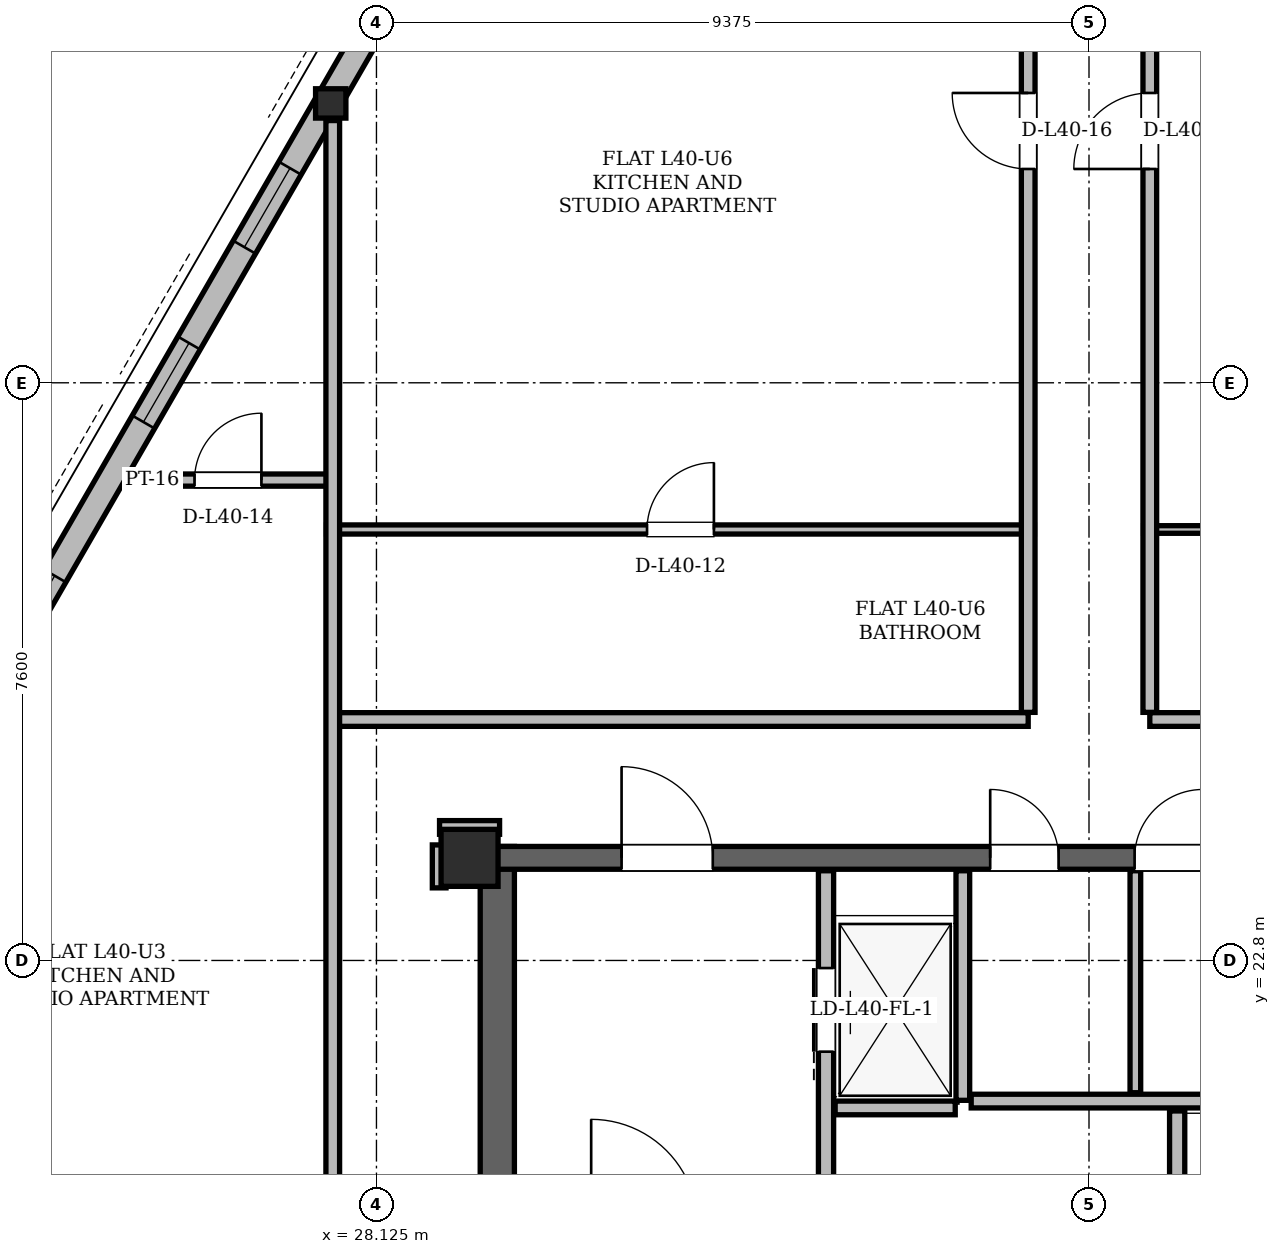
"""IFC4 building model, lengths in metres.
Left out: names, types, materials, properties, quantities, classifications, styles, units other than length and angle.
Written with IfcOpenShell. Run it as: python <this file> out.ifc"""

import sys

from ifc_helpers import new_model, si_unit, direction, frame, frame_2d, origin, origin_2d, place, context, subcontext, project, spatial, rectangle, hollow_rectangle, i_section, extrude, element, fill, save


model = new_model("IFC4")
c1 = context("Model", 3, precision=1e-05, world=origin(), true_north=direction((0.0, 1.0)))
c2 = subcontext(c1, "Body", "Model", "MODEL_VIEW")
j1 = project(units=[si_unit("LENGTHUNIT", "METRE"), si_unit("PLANEANGLEUNIT", "RADIAN")], contexts=[c1])
p1 = place(None, origin())
s1 = spatial("IfcSite", under=j1, at=p1, CompositionType="ELEMENT")
p2 = place(p1, origin())
s2 = spatial("IfcBuilding", under=s1, at=p2, CompositionType="ELEMENT")
p3 = place(p2, frame((0.0, 0.0, 153.0)))
s3 = spatial("IfcBuildingStorey", under=s2, at=p3, CompositionType="ELEMENT", Elevation=153.0)
p4 = place(p3, frame((29.35, 24.15, 0.0), z_axis=(0.0, 0.0, 1.0), x_axis=(1.0, 0.0, 0.0)))
e1 = element("IfcColumn", 1, at=p4, inside=s3, PredefinedType="COLUMN", context=c2, shape_type="SweptSolid", body=[
    extrude(hollow_rectangle(XDim=0.75, YDim=0.75, WallThickness=0.06, at=origin_2d()), origin(), (0.0, 0.0, 1.0), 3.6),
])
p5 = place(p3, frame((27.487, 34.089, 0.004), z_axis=(0.020322934204, -0.007408695078, 0.999766017417), x_axis=(0.34249983262, 0.939517889481, 0.0)))
e2 = element("IfcColumn", 2, at=p5, inside=s3, PredefinedType="COLUMN", context=c2, shape_type="SweptSolid", body=[
    extrude(i_section(OverallWidth=0.399, OverallDepth=0.386, WebThickness=0.021, FlangeThickness=0.033, at=origin_2d()), origin(), (0.0, 0.0, 1.0), 3.592),
])
p6 = place(p3, frame((29.715, 11.0, 0.0), z_axis=(0.0, 0.0, 1.0), x_axis=(0.0, 1.0, 0.0)))
e3 = element("IfcWall", 3, at=p6, inside=s3, PredefinedType="SHEAR", context=c2, shape_type="SweptSolid", body=[
    extrude(rectangle(XDim=13.3, YDim=0.45, at=frame_2d((6.65, 0.0))), origin(), (0.0, 0.0, 1.0), 3.38),
])
p7 = place(p3, frame((29.65, 24.15, 0.0), z_axis=(0.0, 0.0, 1.0), x_axis=(1.0, 0.0, 0.0)))
e4 = element("IfcWall", 4, at=p7, inside=s3, PredefinedType="SHEAR", context=c2, shape_type="SweptSolid", body=[
    extrude(rectangle(XDim=15.7, YDim=0.3, at=frame_2d((7.85, 0.0))), origin(), (0.0, 0.0, 1.0), 3.38),
])
p8 = place(p7, frame((1.7, 0.0, 0.0)))
e5 = element("IfcOpeningElement", 5, at=p8, cuts=e4, PredefinedType="OPENING", context=c2, shape_type="SweptSolid", body=[
    extrude(rectangle(XDim=1.2, YDim=2.2, at=frame_2d((0.6, 1.1))), frame((0.0, 0.15, 0.0), z_axis=(0.0, -1.0, 0.0), x_axis=(1.0, 0.0, 0.0)), (0.0, 0.0, 1.0), 0.3),
])
p9 = place(p7, frame((12.8, 0.0, 0.0)))
e6 = element("IfcOpeningElement", 6, at=p9, cuts=e4, PredefinedType="OPENING", context=c2, shape_type="SweptSolid", body=[
    extrude(rectangle(XDim=1.2, YDim=2.2, at=frame_2d((0.6, 1.1))), frame((0.0, 0.15, 0.0), z_axis=(0.0, -1.0, 0.0), x_axis=(1.0, 0.0, 0.0)), (0.0, 0.0, 1.0), 0.3),
])
p10 = place(p7, frame((6.55, 0.0, 0.0)))
e7 = element("IfcOpeningElement", 7, at=p10, cuts=e4, PredefinedType="OPENING", context=c2, shape_type="SweptSolid", body=[
    extrude(rectangle(XDim=0.9, YDim=2.05, at=frame_2d((0.45, 1.025))), frame((0.0, 0.15, 0.0), z_axis=(0.0, -1.0, 0.0), x_axis=(1.0, 0.0, 0.0)), (0.0, 0.0, 1.0), 0.3),
])
p11 = place(p7, frame((8.45, 0.0, 0.0)))
e8 = element("IfcOpeningElement", 8, at=p11, cuts=e4, PredefinedType="OPENING", context=c2, shape_type="SweptSolid", body=[
    extrude(rectangle(XDim=0.9, YDim=2.05, at=frame_2d((0.45, 1.025))), frame((0.0, 0.15, 0.0), z_axis=(0.0, -1.0, 0.0), x_axis=(1.0, 0.0, 0.0)), (0.0, 0.0, 1.0), 0.3),
])
p12 = place(p3, frame((32.818, 43.322, 0.0), z_axis=(0.0, 0.0, 1.0), x_axis=(-0.500000946011, -0.866024857604, 0.0)))
e9 = element("IfcWall", 9, at=p12, inside=s3, PredefinedType="SOLIDWALL", context=c2, shape_type="SweptSolid", body=[
    extrude(rectangle(XDim=35.54, YDim=0.34, at=frame_2d((17.77, 0.0))), origin(), (0.0, 0.0, 1.0), 2.6),
])
p13 = place(p12, frame((6.579, 0.0, 0.0)))
e10 = element("IfcOpeningElement", 10, at=p13, cuts=e9, PredefinedType="OPENING", context=c2, shape_type="SweptSolid", body=[
    extrude(rectangle(XDim=1.5, YDim=2.2, at=frame_2d((0.75, 1.1))), frame((0.0, 0.17, 0.0), z_axis=(0.0, -1.0, 0.0), x_axis=(1.0, 0.0, 0.0)), (0.0, 0.0, 1.0), 0.34),
])
p14 = place(p12, frame((26.005, 0.0, 0.0)))
e11 = element("IfcOpeningElement", 11, at=p14, cuts=e9, PredefinedType="OPENING", context=c2, shape_type="SweptSolid", body=[
    extrude(rectangle(XDim=1.5, YDim=2.2, at=frame_2d((0.75, 1.1))), frame((0.0, 0.17, 0.0), z_axis=(0.0, -1.0, 0.0), x_axis=(1.0, 0.0, 0.0)), (0.0, 0.0, 1.0), 0.34),
])
p15 = place(p12, frame((33.049, 0.0, 0.85)))
e12 = element("IfcOpeningElement", 12, at=p15, cuts=e9, PredefinedType="OPENING", context=c2, shape_type="SweptSolid", body=[
    extrude(rectangle(XDim=1.2, YDim=1.48, at=frame_2d((0.6, 0.74))), frame((0.0, 0.17, 0.0), z_axis=(0.0, -1.0, 0.0), x_axis=(1.0, 0.0, 0.0)), (0.0, 0.0, 1.0), 0.34),
])
p16 = place(p12, frame((17.853, 0.0, 0.85)))
e13 = element("IfcOpeningElement", 13, at=p16, cuts=e9, PredefinedType="OPENING", context=c2, shape_type="SweptSolid", body=[
    extrude(rectangle(XDim=1.2, YDim=1.48, at=frame_2d((0.6, 0.74))), frame((0.0, 0.17, 0.0), z_axis=(0.0, -1.0, 0.0), x_axis=(1.0, 0.0, 0.0)), (0.0, 0.0, 1.0), 0.34),
])
p17 = place(p12, frame((11.661, 0.0, 0.85)))
e14 = element("IfcOpeningElement", 14, at=p17, cuts=e9, PredefinedType="OPENING", context=c2, shape_type="SweptSolid", body=[
    extrude(rectangle(XDim=1.2, YDim=1.48, at=frame_2d((0.6, 0.74))), frame((0.0, 0.17, 0.0), z_axis=(0.0, -1.0, 0.0), x_axis=(1.0, 0.0, 0.0)), (0.0, 0.0, 1.0), 0.34),
])
p18 = place(p12, frame((14.317, 0.0, 0.85)))
e15 = element("IfcOpeningElement", 15, at=p18, cuts=e9, PredefinedType="OPENING", context=c2, shape_type="SweptSolid", body=[
    extrude(rectangle(XDim=1.2, YDim=1.48, at=frame_2d((0.6, 0.74))), frame((0.0, 0.17, 0.0), z_axis=(0.0, -1.0, 0.0), x_axis=(1.0, 0.0, 0.0)), (0.0, 0.0, 1.0), 0.34),
])
p19 = place(p12, frame((2.865, 0.0, 0.85)))
e16 = element("IfcOpeningElement", 16, at=p19, cuts=e9, PredefinedType="OPENING", context=c2, shape_type="SweptSolid", body=[
    extrude(rectangle(XDim=1.6, YDim=1.64, at=frame_2d((0.8, 0.82))), frame((0.0, 0.17, 0.0), z_axis=(0.0, -1.0, 0.0), x_axis=(1.0, 0.0, 0.0)), (0.0, 0.0, 1.0), 0.34),
])
p20 = place(p3, frame((34.04, 19.48, 0.0), z_axis=(0.0, 0.0, 1.0), x_axis=(0.0, 1.0, 0.0)))
e17 = element("IfcWall", 17, at=p20, inside=s3, PredefinedType="PARTITIONING", context=c2, shape_type="SweptSolid", body=[
    extrude(rectangle(XDim=4.5, YDim=0.2, at=frame_2d((2.25, 0.0))), origin(), (0.0, 0.0, 1.0), 2.42),
])
p21 = place(p20, frame((2.12, 0.0, 0.0)))
e18 = element("IfcOpeningElement", 18, at=p21, cuts=e17, PredefinedType="OPENING", context=c2, shape_type="SweptSolid", body=[
    extrude(rectangle(XDim=1.1, YDim=2.2, at=frame_2d((0.55, 1.1))), frame((0.0, 0.1, 0.0), z_axis=(0.0, -1.0, 0.0), x_axis=(1.0, 0.0, 0.0)), (0.0, 0.0, 1.0), 0.2),
])
p22 = place(p3, frame((35.84, 20.96, 0.0), z_axis=(0.0, 0.0, 1.0), x_axis=(0.0, 1.0, 0.0)))
e19 = element("IfcWall", 19, at=p22, inside=s3, PredefinedType="PARTITIONING", context=c2, shape_type="SweptSolid", body=[
    extrude(rectangle(XDim=3.02, YDim=0.18, at=frame_2d((1.51, 0.0))), origin(), (0.0, 0.0, 1.0), 2.42),
])
p23 = place(p3, frame((34.16, 20.86, 0.0), z_axis=(0.0, 0.0, 1.0), x_axis=(1.0, 0.0, 0.0)))
e20 = element("IfcWall", 20, at=p23, inside=s3, PredefinedType="PARTITIONING", context=c2, shape_type="SweptSolid", body=[
    extrude(rectangle(XDim=1.58, YDim=0.18, at=frame_2d((0.79, 0.0))), origin(), (0.0, 0.0, 1.0), 3.38),
])
p24 = place(p3, frame((38.66, 11.72, 0.0), z_axis=(0.0, 0.0, 1.0), x_axis=(0.0, 1.0, 0.0)))
e21 = element("IfcWall", 21, at=p24, inside=s3, PredefinedType="PARTITIONING", context=c2, shape_type="SweptSolid", body=[
    extrude(rectangle(XDim=9.1, YDim=0.2, at=frame_2d((4.55, 0.0))), origin(), (0.0, 0.0, 1.0), 3.38),
])
p25 = place(p24, frame((0.255, 0.0, 0.0)))
e22 = element("IfcOpeningElement", 22, at=p25, cuts=e21, PredefinedType="OPENING", context=c2, shape_type="SweptSolid", body=[
    extrude(rectangle(XDim=1.05, YDim=2.15, at=frame_2d((0.525, 1.075))), frame((0.0, 0.1, 0.0), z_axis=(0.0, -1.0, 0.0), x_axis=(1.0, 0.0, 0.0)), (0.0, 0.0, 1.0), 0.2),
])
p26 = place(p24, frame((2.105, 0.0, 0.0)))
e23 = element("IfcOpeningElement", 23, at=p26, cuts=e21, PredefinedType="OPENING", context=c2, shape_type="SweptSolid", body=[
    extrude(rectangle(XDim=1.05, YDim=2.15, at=frame_2d((0.525, 1.075))), frame((0.0, 0.1, 0.0), z_axis=(0.0, -1.0, 0.0), x_axis=(1.0, 0.0, 0.0)), (0.0, 0.0, 1.0), 0.2),
])
p27 = place(p24, frame((3.955, 0.0, 0.0)))
e24 = element("IfcOpeningElement", 24, at=p27, cuts=e21, PredefinedType="OPENING", context=c2, shape_type="SweptSolid", body=[
    extrude(rectangle(XDim=1.05, YDim=2.15, at=frame_2d((0.525, 1.075))), frame((0.0, 0.1, 0.0), z_axis=(0.0, -1.0, 0.0), x_axis=(1.0, 0.0, 0.0)), (0.0, 0.0, 1.0), 0.2),
])
p28 = place(p3, frame((35.95, 20.95, 0.0), z_axis=(0.0, 0.0, 1.0), x_axis=(1.0, 0.0, 0.0)))
e25 = element("IfcWall", 25, at=p28, inside=s3, PredefinedType="PARTITIONING", context=c2, shape_type="SweptSolid", body=[
    extrude(rectangle(XDim=3.1, YDim=0.18, at=frame_2d((1.55, 0.0))), origin(), (0.0, 0.0, 1.0), 3.38),
])
p29 = place(p3, frame((38.11, 21.06, 0.0), z_axis=(0.0, 0.0, 1.0), x_axis=(0.0, 1.0, 0.0)))
e26 = element("IfcWall", 26, at=p29, inside=s3, PredefinedType="PARTITIONING", context=c2, shape_type="SweptSolid", body=[
    extrude(rectangle(XDim=2.92, YDim=0.14, at=frame_2d((1.46, 0.0))), origin(), (0.0, 0.0, 1.0), 2.42),
])
p30 = place(p3, frame((28.955, 24.55, 0.0), z_axis=(0.0, 0.0, 1.0), x_axis=(1.0, 0.0, 0.0)))
e27 = element("IfcWall", 27, at=p30, inside=s3, PredefinedType="PARTITIONING", context=c2, shape_type="SweptSolid", body=[
    extrude(rectangle(XDim=0.79, YDim=0.18, at=frame_2d((0.395, 0.0))), origin(), (0.0, 0.0, 1.0), 2.842),
])
p31 = place(p3, frame((27.55, 25.97, 0.0), z_axis=(0.0, 0.0, 1.0), x_axis=(1.0, 0.0, 0.0)))
e28 = element("IfcWall", 28, at=p31, inside=s3, PredefinedType="PARTITIONING", context=c2, shape_type="SweptSolid", body=[
    extrude(rectangle(XDim=9.15, YDim=0.18, at=frame_2d((4.575, 0.0))), origin(), (0.0, 0.0, 1.0), 2.842),
])
p32 = place(p3, frame((38.3, 25.97, 0.0), z_axis=(0.0, 0.0, 1.0), x_axis=(1.0, 0.0, 0.0)))
e29 = element("IfcWall", 29, at=p32, inside=s3, PredefinedType="PARTITIONING", context=c2, shape_type="SweptSolid", body=[
    extrude(rectangle(XDim=11.7, YDim=0.18, at=frame_2d((5.85, 0.0))), origin(), (0.0, 0.0, 1.0), 2.842),
])
p33 = place(p32, frame((9.832, 0.0, 0.0)))
e30 = element("IfcOpeningElement", 30, at=p33, cuts=e29, PredefinedType="OPENING", context=c2, shape_type="SweptSolid", body=[
    extrude(rectangle(XDim=1.0, YDim=2.18, at=frame_2d((0.5, 1.09))), frame((0.0, 0.09, 0.0), z_axis=(0.0, -1.0, 0.0), x_axis=(1.0, 0.0, 0.0)), (0.0, 0.0, 1.0), 0.18),
])
p34 = place(p3, frame((27.468, 28.47, 0.0), z_axis=(0.0, 0.0, 1.0), x_axis=(1.0, 0.0, 0.0)))
e31 = element("IfcWall", 31, at=p34, inside=s3, PredefinedType="PARTITIONING", context=c2, shape_type="SweptSolid", body=[
    extrude(rectangle(XDim=9.314, YDim=0.12, at=frame_2d((4.657, 0.0))), origin(), (0.0, 0.0, 1.0), 3.38),
])
p35 = place(p34, frame((4.217, 0.0, 0.0)))
e32 = element("IfcOpeningElement", 32, at=p35, cuts=e31, PredefinedType="OPENING", context=c2, shape_type="SweptSolid", body=[
    extrude(rectangle(XDim=0.88, YDim=2.08, at=frame_2d((0.44, 1.04))), frame((0.0, 0.06, 0.0), z_axis=(0.0, -1.0, 0.0), x_axis=(1.0, 0.0, 0.0)), (0.0, 0.0, 1.0), 0.12),
])
p36 = place(p3, frame((38.218, 28.47, 0.0), z_axis=(0.0, 0.0, 1.0), x_axis=(1.0, 0.0, 0.0)))
e33 = element("IfcWall", 33, at=p36, inside=s3, PredefinedType="PARTITIONING", context=c2, shape_type="SweptSolid", body=[
    extrude(rectangle(XDim=7.424, YDim=0.1, at=frame_2d((3.712, 0.0))), origin(), (0.0, 0.0, 1.0), 3.38),
])
p37 = place(p36, frame((3.272, 0.0, 0.0)))
e34 = element("IfcOpeningElement", 34, at=p37, cuts=e33, PredefinedType="OPENING", context=c2, shape_type="SweptSolid", body=[
    extrude(rectangle(XDim=0.88, YDim=2.08, at=frame_2d((0.44, 1.04))), frame((0.0, 0.05, 0.0), z_axis=(0.0, -1.0, 0.0), x_axis=(1.0, 0.0, 0.0)), (0.0, 0.0, 1.0), 0.1),
])
p38 = place(p3, frame((24.819, 29.12, 0.0), z_axis=(0.0, 0.0, 1.0), x_axis=(1.0, 0.0, 0.0)))
e35 = element("IfcWall", 35, at=p38, inside=s3, PredefinedType="PARTITIONING", context=c2, shape_type="SweptSolid", body=[
    extrude(rectangle(XDim=2.813, YDim=0.16, at=frame_2d((1.406, 0.0))), origin(), (0.0, 0.0, 1.0), 3.38),
])
p39 = place(p38, frame((0.912, 0.0, 0.0)))
e36 = element("IfcOpeningElement", 36, at=p39, cuts=e35, PredefinedType="OPENING", context=c2, shape_type="SweptSolid", body=[
    extrude(rectangle(XDim=0.88, YDim=2.08, at=frame_2d((0.44, 1.04))), frame((0.0, 0.08, 0.0), z_axis=(0.0, -1.0, 0.0), x_axis=(1.0, 0.0, 0.0)), (0.0, 0.0, 1.0), 0.16),
])
p40 = place(p3, frame((27.55, 18.544, 0.0), z_axis=(0.0, 0.0, 1.0), x_axis=(0.0, 1.0, 0.0)))
e37 = element("IfcWall", 37, at=p40, inside=s3, PredefinedType="PARTITIONING", context=c2, shape_type="SweptSolid", body=[
    extrude(rectangle(XDim=15.306, YDim=0.18, at=frame_2d((7.653, 0.0))), origin(), (0.0, 0.0, 1.0), 3.38),
])
p41 = place(p3, frame((28.95, 23.755, 0.0), z_axis=(0.0, 0.0, 1.0), x_axis=(0.0, 1.0, 0.0)))
e38 = element("IfcWall", 38, at=p41, inside=s3, PredefinedType="PARTITIONING", context=c2, shape_type="SweptSolid", body=[
    extrude(rectangle(XDim=0.565, YDim=0.18, at=frame_2d((0.283, 0.0))), origin(), (0.0, 0.0, 1.0), 3.38),
])
p42 = place(p3, frame((36.7, 26.064, 0.0), z_axis=(0.0, 0.0, 1.0), x_axis=(0.0, 1.0, 0.0)))
e39 = element("IfcWall", 39, at=p42, inside=s3, PredefinedType="PARTITIONING", context=c2, shape_type="SweptSolid", body=[
    extrude(rectangle(XDim=17.084, YDim=0.18, at=frame_2d((8.542, 0.0))), origin(), (0.0, 0.0, 1.0), 3.38),
])
p43 = place(p42, frame((7.149, 0.0, 0.0)))
e40 = element("IfcOpeningElement", 40, at=p43, cuts=e39, PredefinedType="OPENING", context=c2, shape_type="SweptSolid", body=[
    extrude(rectangle(XDim=1.0, YDim=2.18, at=frame_2d((0.5, 1.09))), frame((0.0, 0.09, 0.0), z_axis=(0.0, -1.0, 0.0), x_axis=(1.0, 0.0, 0.0)), (0.0, 0.0, 1.0), 0.18),
])
p44 = place(p3, frame((38.3, 26.064, 0.0), z_axis=(0.0, 0.0, 1.0), x_axis=(0.0, 1.0, 0.0)))
e41 = element("IfcWall", 41, at=p44, inside=s3, PredefinedType="PARTITIONING", context=c2, shape_type="SweptSolid", body=[
    extrude(rectangle(XDim=13.442, YDim=0.18, at=frame_2d((6.721, 0.0))), origin(), (0.0, 0.0, 1.0), 3.38),
])
p45 = place(p44, frame((7.149, 0.0, 0.0)))
e42 = element("IfcOpeningElement", 42, at=p45, cuts=e41, PredefinedType="OPENING", context=c2, shape_type="SweptSolid", body=[
    extrude(rectangle(XDim=1.0, YDim=2.18, at=frame_2d((0.5, 1.09))), frame((0.0, 0.09, 0.0), z_axis=(0.0, -1.0, 0.0), x_axis=(1.0, 0.0, 0.0)), (0.0, 0.0, 1.0), 0.18),
])
p46 = place(p16, origin())
e43 = element("IfcWindow", 43, at=p46, inside=s3, PartitioningType="SINGLE_PANEL", PredefinedType="WINDOW", context=c2, shape_type="SweptSolid", body=[
    extrude(rectangle(XDim=1.2, YDim=1.48, at=frame_2d((0.6, 0.74))), frame((0.0, 0.03, 0.0), z_axis=(0.0, -1.0, 0.0), x_axis=(1.0, 0.0, 0.0)), (0.0, 0.0, 1.0), 0.06),
])
fill(e13, e43)
p47 = place(p17, origin())
e44 = element("IfcWindow", 44, at=p47, inside=s3, PartitioningType="SINGLE_PANEL", PredefinedType="WINDOW", context=c2, shape_type="SweptSolid", body=[
    extrude(rectangle(XDim=1.2, YDim=1.48, at=frame_2d((0.6, 0.74))), frame((0.0, 0.03, 0.0), z_axis=(0.0, -1.0, 0.0), x_axis=(1.0, 0.0, 0.0)), (0.0, 0.0, 1.0), 0.06),
])
fill(e14, e44)
p48 = place(p18, origin())
e45 = element("IfcWindow", 45, at=p48, inside=s3, PartitioningType="SINGLE_PANEL", PredefinedType="WINDOW", context=c2, shape_type="SweptSolid", body=[
    extrude(rectangle(XDim=1.2, YDim=1.48, at=frame_2d((0.6, 0.74))), frame((0.0, 0.03, 0.0), z_axis=(0.0, -1.0, 0.0), x_axis=(1.0, 0.0, 0.0)), (0.0, 0.0, 1.0), 0.06),
])
fill(e15, e45)
p49 = place(p21, origin())
e46 = element("IfcDoor", 46, at=p49, inside=s3, OperationType="SLIDING_TO_LEFT", PredefinedType="DOOR", context=c2, shape_type="SweptSolid", body=[
    extrude(rectangle(XDim=1.1, YDim=2.2, at=frame_2d((0.55, 1.1))), frame((0.0, 0.025, 0.0), z_axis=(0.0, -1.0, 0.0), x_axis=(1.0, 0.0, 0.0)), (0.0, 0.0, 1.0), 0.05),
])
fill(e18, e46)
p50 = place(p8, origin())
e47 = element("IfcDoor", 47, at=p50, inside=s3, OperationType="SINGLE_SWING_LEFT", PredefinedType="DOOR", context=c2, shape_type="SweptSolid", body=[
    extrude(rectangle(XDim=1.2, YDim=2.2, at=frame_2d((0.6, 1.1))), frame((0.0, 0.025, 0.0), z_axis=(0.0, -1.0, 0.0), x_axis=(1.0, 0.0, 0.0)), (0.0, 0.0, 1.0), 0.05),
])
fill(e5, e47)
p51 = place(p10, origin())
e48 = element("IfcDoor", 48, at=p51, inside=s3, OperationType="SINGLE_SWING_LEFT", PredefinedType="DOOR", context=c2, shape_type="SweptSolid", body=[
    extrude(rectangle(XDim=0.9, YDim=2.05, at=frame_2d((0.45, 1.025))), frame((0.0, 0.025, 0.0), z_axis=(0.0, -1.0, 0.0), x_axis=(1.0, 0.0, 0.0)), (0.0, 0.0, 1.0), 0.05),
])
fill(e7, e48)
p52 = place(p11, origin())
e49 = element("IfcDoor", 49, at=p52, inside=s3, OperationType="SINGLE_SWING_RIGHT", PredefinedType="DOOR", context=c2, shape_type="SweptSolid", body=[
    extrude(rectangle(XDim=0.9, YDim=2.05, at=frame_2d((0.45, 1.025))), frame((0.0, 0.025, 0.0), z_axis=(0.0, -1.0, 0.0), x_axis=(1.0, 0.0, 0.0)), (0.0, 0.0, 1.0), 0.05),
])
fill(e8, e49)
p53 = place(p35, origin())
e50 = element("IfcDoor", 50, at=p53, inside=s3, OperationType="SINGLE_SWING_RIGHT", PredefinedType="DOOR", context=c2, shape_type="SweptSolid", body=[
    extrude(rectangle(XDim=0.88, YDim=2.08, at=frame_2d((0.44, 1.04))), frame((0.0, 0.025, 0.0), z_axis=(0.0, -1.0, 0.0), x_axis=(1.0, 0.0, 0.0)), (0.0, 0.0, 1.0), 0.05),
])
fill(e32, e50)
p54 = place(p39, origin())
e51 = element("IfcDoor", 51, at=p54, inside=s3, OperationType="SINGLE_SWING_RIGHT", PredefinedType="DOOR", context=c2, shape_type="SweptSolid", body=[
    extrude(rectangle(XDim=0.88, YDim=2.08, at=frame_2d((0.44, 1.04))), frame((0.0, 0.025, 0.0), z_axis=(0.0, -1.0, 0.0), x_axis=(1.0, 0.0, 0.0)), (0.0, 0.0, 1.0), 0.05),
])
fill(e36, e51)
p55 = place(p43, origin())
e52 = element("IfcDoor", 52, at=p55, inside=s3, OperationType="SINGLE_SWING_RIGHT", PredefinedType="DOOR", context=c2, shape_type="SweptSolid", body=[
    extrude(rectangle(XDim=1.0, YDim=2.18, at=frame_2d((0.5, 1.09))), frame((0.0, 0.025, 0.0), z_axis=(0.0, -1.0, 0.0), x_axis=(1.0, 0.0, 0.0)), (0.0, 0.0, 1.0), 0.05),
])
fill(e40, e52)
p56 = place(p45, origin())
e53 = element("IfcDoor", 53, at=p56, inside=s3, OperationType="SINGLE_SWING_LEFT", PredefinedType="DOOR", context=c2, shape_type="SweptSolid", body=[
    extrude(rectangle(XDim=1.0, YDim=2.18, at=frame_2d((0.5, 1.09))), frame((0.0, 0.025, 0.0), z_axis=(0.0, -1.0, 0.0), x_axis=(1.0, 0.0, 0.0)), (0.0, 0.0, 1.0), 0.05),
])
fill(e42, e53)
save(model, sys.argv[1])
